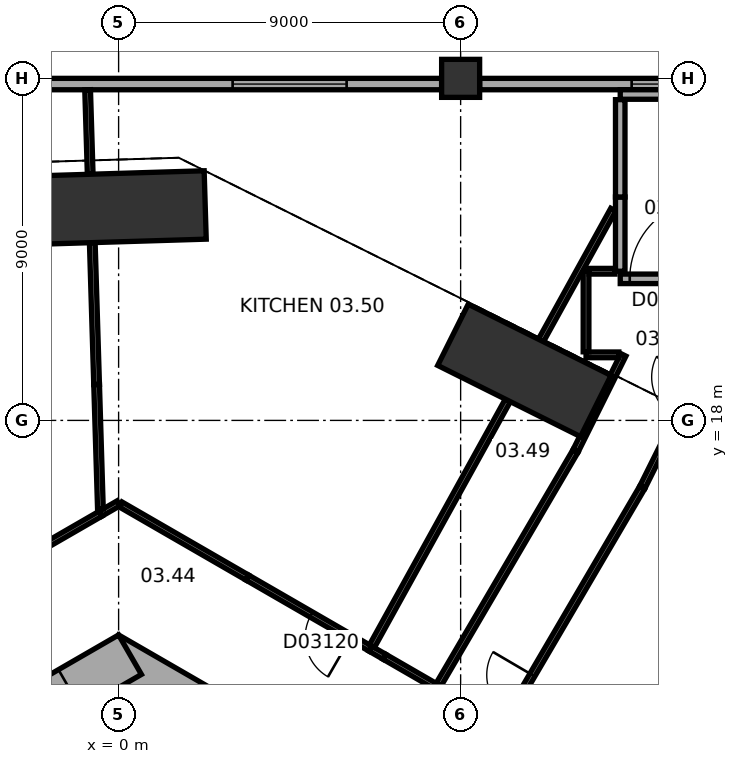
"""IFC4 building model, lengths in metres.
Left out: names, types, materials, properties, quantities, classifications, styles, units other than length and angle.
Written with IfcOpenShell. Run it as: python <this file> out.ifc"""

import sys

from ifc_helpers import new_model, si_unit, direction, frame, frame_2d, origin, origin_2d, place, context, subcontext, project, spatial, rectangle, extrude, element, fill, save


model = new_model("IFC4")
c1 = context("Model", 3, precision=1e-05, world=origin(), true_north=direction((0.0, 1.0)))
c2 = subcontext(c1, "Body", "Model", "MODEL_VIEW")
j1 = project(units=[si_unit("LENGTHUNIT", "METRE"), si_unit("PLANEANGLEUNIT", "RADIAN")], contexts=[c1])
p1 = place(None, origin())
s1 = spatial("IfcSite", under=j1, at=p1, CompositionType="ELEMENT")
p2 = place(p1, origin())
s2 = spatial("IfcBuilding", under=s1, at=p2, CompositionType="ELEMENT")
p3 = place(p2, frame((0.0, 0.0, 21.0)))
s3 = spatial("IfcBuildingStorey", under=s2, at=p3, CompositionType="ELEMENT", Elevation=21.0)
p4 = place(p3, frame((10.677, 19.315, 0.0), z_axis=(0.0, 0.0, 1.0), x_axis=(-0.894935140363, 0.446196251154, 0.0)))
e1 = element("IfcColumn", 1, at=p4, inside=s3, PredefinedType="COLUMN", context=c2, shape_type="SweptSolid", body=[
    extrude(rectangle(XDim=4.2, YDim=1.8, at=origin_2d()), origin(), (0.0, 0.0, 1.0), 8.0),
])
p5 = place(p3, frame((-0.72, 23.577, 0.0), z_axis=(0.0, 0.0, 1.0), x_axis=(-0.999533644135, -0.030536768695, 0.0)))
e2 = element("IfcColumn", 2, at=p5, inside=s3, PredefinedType="COLUMN", context=c2, shape_type="SweptSolid", body=[
    extrude(rectangle(XDim=6.0, YDim=1.8, at=origin_2d()), origin(), (0.0, 0.0, 1.0), 8.0),
])
p6 = place(p3, frame((9.0, 27.0, 0.0), z_axis=(0.0, 0.0, 1.0), x_axis=(1.0, 0.0, 0.0)))
e3 = element("IfcColumn", 3, at=p6, inside=s3, PredefinedType="COLUMN", context=c2, shape_type="SweptSolid", body=[
    extrude(rectangle(XDim=1.0, YDim=1.0, at=origin_2d()), origin(), (0.0, 0.0, 1.0), 8.0),
])
p7 = place(p3, frame((10.4, 5.658, 0.0), z_axis=(0.0, 0.0, 1.0), x_axis=(-0.866021384402, 0.500006961711, 0.0)))
e4 = element("IfcWall", 4, at=p7, inside=s3, PredefinedType="SHEAR", context=c2, shape_type="SweptSolid", body=[
    extrude(rectangle(XDim=12.355, YDim=1.2, at=frame_2d((6.178, 0.0))), origin(), (0.0, 0.0, 1.0), 8.0),
])
p8 = place(p7, frame((2.728, 0.0, 0.0)))
e5 = element("IfcOpeningElement", 5, at=p8, cuts=e4, PredefinedType="OPENING", context=c2, shape_type="SweptSolid", body=[
    extrude(rectangle(XDim=1.1, YDim=2.1, at=frame_2d((0.55, 1.05))), frame((0.0, 0.61, 0.0), z_axis=(0.0, -1.0, 0.0), x_axis=(1.0, 0.0, 0.0)), (0.0, 0.0, 1.0), 1.22),
])
p9 = place(p7, frame((5.328, 0.0, 0.0)))
e6 = element("IfcOpeningElement", 6, at=p9, cuts=e4, PredefinedType="OPENING", context=c2, shape_type="SweptSolid", body=[
    extrude(rectangle(XDim=1.1, YDim=2.1, at=frame_2d((0.55, 1.05))), frame((0.0, 0.61, 0.0), z_axis=(0.0, -1.0, 0.0), x_axis=(1.0, 0.0, 0.0)), (0.0, 0.0, 1.0), 1.22),
])
p10 = place(p7, frame((7.928, 0.0, 0.0)))
e7 = element("IfcOpeningElement", 7, at=p10, cuts=e4, PredefinedType="OPENING", context=c2, shape_type="SweptSolid", body=[
    extrude(rectangle(XDim=1.1, YDim=2.1, at=frame_2d((0.55, 1.05))), frame((0.0, 0.61, 0.0), z_axis=(0.0, -1.0, 0.0), x_axis=(1.0, 0.0, 0.0)), (0.0, 0.0, 1.0), 1.22),
])
p11 = place(p3, frame((0.3, 11.836, 0.0), z_axis=(0.0, 0.0, 1.0), x_axis=(-0.866021384402, -0.500006961711, 0.0)))
e8 = element("IfcWall", 8, at=p11, inside=s3, PredefinedType="SHEAR", context=c2, shape_type="SweptSolid", body=[
    extrude(rectangle(XDim=12.355, YDim=1.2, at=frame_2d((6.178, 0.0))), origin(), (0.0, 0.0, 1.0), 8.0),
])
p12 = place(p11, frame((6.378, 0.0, 0.0)))
e9 = element("IfcOpeningElement", 9, at=p12, cuts=e8, PredefinedType="OPENING", context=c2, shape_type="SweptSolid", body=[
    extrude(rectangle(XDim=1.5, YDim=2.1, at=frame_2d((0.75, 1.05))), frame((0.0, 0.61, 0.0), z_axis=(0.0, -1.0, 0.0), x_axis=(1.0, 0.0, 0.0)), (0.0, 0.0, 1.0), 1.22),
])
p13 = place(p11, frame((1.828, 0.0, 0.0)))
e10 = element("IfcOpeningElement", 10, at=p13, cuts=e8, PredefinedType="OPENING", context=c2, shape_type="SweptSolid", body=[
    extrude(rectangle(XDim=1.1, YDim=2.1, at=frame_2d((0.55, 1.05))), frame((0.0, 0.61, 0.0), z_axis=(0.0, -1.0, 0.0), x_axis=(1.0, 0.0, 0.0)), (0.0, 0.0, 1.0), 1.22),
])
p14 = place(p3, frame((26.5, 26.85, 0.0), z_axis=(0.0, 0.0, 1.0), x_axis=(-1.0, 0.0, 0.0)))
e11 = element("IfcWall", 11, at=p14, inside=s3, PredefinedType="STANDARD", context=c2, shape_type="SweptSolid", body=[
    extrude(rectangle(XDim=17.0, YDim=0.3, at=frame_2d((8.5, 0.0))), origin(), (0.0, 0.0, 1.0), 6.5),
])
p15 = place(p14, frame((3.0, 0.0, 1.0)))
e12 = element("IfcOpeningElement", 12, at=p15, cuts=e11, PredefinedType="OPENING", context=c2, shape_type="SweptSolid", body=[
    extrude(rectangle(XDim=3.0, YDim=4.0, at=frame_2d((1.5, 2.0))), frame((0.0, 0.16, 0.0), z_axis=(0.0, -1.0, 0.0), x_axis=(1.0, 0.0, 0.0)), (0.0, 0.0, 1.0), 0.32),
])
p16 = place(p14, frame((10.0, 0.0, 1.0)))
e13 = element("IfcOpeningElement", 13, at=p16, cuts=e11, PredefinedType="OPENING", context=c2, shape_type="SweptSolid", body=[
    extrude(rectangle(XDim=3.0, YDim=4.0, at=frame_2d((1.5, 2.0))), frame((0.0, 0.16, 0.0), z_axis=(0.0, -1.0, 0.0), x_axis=(1.0, 0.0, 0.0)), (0.0, 0.0, 1.0), 0.32),
])
p17 = place(p3, frame((8.5, 26.85, 0.0), z_axis=(0.0, 0.0, 1.0), x_axis=(-1.0, 0.0, 0.0)))
e14 = element("IfcWall", 14, at=p17, inside=s3, PredefinedType="STANDARD", context=c2, shape_type="SweptSolid", body=[
    extrude(rectangle(XDim=17.0, YDim=0.3, at=frame_2d((8.5, 0.0))), origin(), (0.0, 0.0, 1.0), 6.5),
])
p18 = place(p17, frame((2.5, 0.0, 1.0)))
e15 = element("IfcOpeningElement", 15, at=p18, cuts=e14, PredefinedType="OPENING", context=c2, shape_type="SweptSolid", body=[
    extrude(rectangle(XDim=3.0, YDim=4.0, at=frame_2d((1.5, 2.0))), frame((0.0, 0.16, 0.0), z_axis=(0.0, -1.0, 0.0), x_axis=(1.0, 0.0, 0.0)), (0.0, 0.0, 1.0), 0.32),
])
p19 = place(p17, frame((11.5, 0.0, 1.0)))
e16 = element("IfcOpeningElement", 16, at=p19, cuts=e14, PredefinedType="OPENING", context=c2, shape_type="SweptSolid", body=[
    extrude(rectangle(XDim=3.0, YDim=4.0, at=frame_2d((1.5, 2.0))), frame((0.0, 0.16, 0.0), z_axis=(0.0, -1.0, 0.0), x_axis=(1.0, 0.0, 0.0)), (0.0, 0.0, 1.0), 0.32),
])
p20 = place(p3, frame((8.422, 11.05, 0.0), z_axis=(0.0, 0.0, 1.0), x_axis=(0.50561651199, 0.862758333952, 0.0)))
e17 = element("IfcWall", 17, at=p20, inside=s3, PredefinedType="PARTITIONING", context=c2, shape_type="SweptSolid", body=[
    extrude(rectangle(XDim=7.118, YDim=0.15, at=frame_2d((3.559, 0.0))), origin(), (0.0, 0.0, 1.0), 6.9),
])
p21 = place(p3, frame((6.995, 11.781, 0.0), z_axis=(0.0, 0.0, 1.0), x_axis=(0.866076391369, -0.499911676512, 0.0)))
e18 = element("IfcWall", 18, at=p21, inside=s3, PredefinedType="PARTITIONING", context=c2, shape_type="SweptSolid", body=[
    extrude(rectangle(XDim=1.601, YDim=0.15, at=frame_2d((0.8, 0.0))), origin(), (0.0, 0.0, 1.0), 7.7),
])
p22 = place(p3, frame((6.995, 11.781, 0.0), z_axis=(0.0, 0.0, 1.0), x_axis=(-0.866281716711, 0.49955578997, 0.0)))
e19 = element("IfcWall", 19, at=p22, inside=s3, PredefinedType="PARTITIONING", context=c2, shape_type="SweptSolid", body=[
    extrude(rectangle(XDim=0.423, YDim=0.15, at=frame_2d((0.211, 0.0))), origin(), (0.0, 0.0, 1.0), 7.7),
])
p23 = place(p3, frame((6.629, 11.992, 0.0), z_axis=(0.0, 0.0, 1.0), x_axis=(-0.86599558016, 0.500051652475, 0.0)))
e20 = element("IfcWall", 20, at=p23, inside=s3, PredefinedType="PARTITIONING", context=c2, shape_type="SweptSolid", body=[
    extrude(rectangle(XDim=3.745, YDim=0.15, at=frame_2d((1.872, 0.0))), origin(), (0.0, 0.0, 1.0), 7.7),
])
p24 = place(p23, frame((0.6, 0.0, 0.0)))
e21 = element("IfcOpeningElement", 21, at=p24, cuts=e20, PredefinedType="OPENING", context=c2, shape_type="SweptSolid", body=[
    extrude(rectangle(XDim=1.2, YDim=2.1, at=frame_2d((0.6, 1.05))), frame((0.0, 0.085, 0.0), z_axis=(0.0, -1.0, 0.0), x_axis=(1.0, 0.0, 0.0)), (0.0, 0.0, 1.0), 0.17),
])
p25 = place(p3, frame((6.668, 12.062, 0.0), z_axis=(0.0, 0.0, 1.0), x_axis=(0.483795376692, 0.875181143245, 0.0)))
e22 = element("IfcWall", 22, at=p25, inside=s3, PredefinedType="PARTITIONING", context=c2, shape_type="SweptSolid", body=[
    extrude(rectangle(XDim=7.387, YDim=0.15, at=frame_2d((3.693, 0.0))), origin(), (0.0, 0.0, 1.0), 7.7),
])
p26 = place(p3, frame((19.949, 12.345, 0.0), z_axis=(0.0, 0.0, 1.0), x_axis=(-0.850341306025, -0.526231568102, 0.0)))
e23 = element("IfcWall", 23, at=p26, inside=s3, PredefinedType="MOVABLE", context=c2, shape_type="SweptSolid", body=[
    extrude(rectangle(XDim=7.787, YDim=0.15, at=frame_2d((3.894, 0.0))), origin(), (0.0, 0.0, 1.0), 7.7),
])
p27 = place(p3, frame((3.386, 13.865, 0.0), z_axis=(0.0, 0.0, 1.0), x_axis=(-0.866006051527, 0.500033517596, 0.0)))
e24 = element("IfcWall", 24, at=p27, inside=s3, PredefinedType="PARTITIONING", context=c2, shape_type="SweptSolid", body=[
    extrude(rectangle(XDim=3.85, YDim=0.15, at=frame_2d((1.925, 0.0))), origin(), (0.0, 0.0, 1.0), 7.7),
])
p28 = place(p3, frame((-2.087, 14.615, 0.0), z_axis=(0.0, 0.0, 1.0), x_axis=(0.866006459158, 0.500032811619, 0.0)))
e25 = element("IfcWall", 25, at=p28, inside=s3, PredefinedType="PARTITIONING", context=c2, shape_type="SweptSolid", body=[
    extrude(rectangle(XDim=1.861, YDim=0.15, at=frame_2d((0.931, 0.0))), origin(), (0.0, 0.0, 1.0), 7.7),
])
p29 = place(p3, frame((-0.475, 15.545, 0.0), z_axis=(0.0, 0.0, 1.0), x_axis=(0.865933599817, 0.500158975434, 0.0)))
e26 = element("IfcWall", 26, at=p29, inside=s3, PredefinedType="PARTITIONING", context=c2, shape_type="SweptSolid", body=[
    extrude(rectangle(XDim=0.549, YDim=0.15, at=frame_2d((0.274, 0.0))), origin(), (0.0, 0.0, 1.0), 7.7),
])
p30 = place(p3, frame((13.772, 16.224, 0.0), z_axis=(0.0, 0.0, 1.0), x_axis=(-0.505547889018, -0.862798546539, 0.0)))
e27 = element("IfcWall", 27, at=p30, inside=s3, PredefinedType="PARTITIONING", context=c2, shape_type="SweptSolid", body=[
    extrude(rectangle(XDim=7.156, YDim=0.15, at=frame_2d((3.578, 0.0))), origin(), (0.0, 0.0, 1.0), 7.7),
])
p31 = place(p30, frame((5.706, 0.0, 0.0)))
e28 = element("IfcOpeningElement", 28, at=p31, cuts=e27, PredefinedType="OPENING", context=c2, shape_type="SweptSolid", body=[
    extrude(rectangle(XDim=1.2, YDim=2.1, at=frame_2d((0.6, 1.05))), frame((0.0, 0.085, 0.0), z_axis=(0.0, -1.0, 0.0), x_axis=(1.0, 0.0, 0.0)), (0.0, 0.0, 1.0), 0.17),
])
p32 = place(p3, frame((12.03, 17.209, 0.0), z_axis=(0.0, 0.0, 1.0), x_axis=(0.445753790741, 0.89515560549, 0.0)))
e29 = element("IfcWall", 29, at=p32, inside=s3, PredefinedType="PARTITIONING", context=c2, shape_type="SweptSolid", body=[
    extrude(rectangle(XDim=2.811, YDim=0.15, at=frame_2d((1.405, 0.0))), origin(), (0.0, 0.0, 1.0), 7.7),
])
p33 = place(p3, frame((-0.579, 18.946, 0.0), z_axis=(0.0, 0.0, 1.0), x_axis=(0.030572886356, -0.999532540051, 0.0)))
e30 = element("IfcWall", 30, at=p33, inside=s3, PredefinedType="PARTITIONING", context=c2, shape_type="SweptSolid", body=[
    extrude(rectangle(XDim=3.282, YDim=0.15, at=frame_2d((1.641, 0.0))), origin(), (0.0, 0.0, 1.0), 7.7),
])
p34 = place(p3, frame((-0.579, 18.946, 0.0), z_axis=(0.0, 0.0, 1.0), x_axis=(-0.030471255388, 0.999535643484, 0.0)))
e31 = element("IfcWall", 31, at=p34, inside=s3, PredefinedType="PARTITIONING", context=c2, shape_type="SweptSolid", body=[
    extrude(rectangle(XDim=3.734, YDim=0.15, at=frame_2d((1.867, 0.0))), origin(), (0.0, 0.0, 1.0), 7.7),
])
p35 = place(p3, frame((15.338, 19.365, 0.0), z_axis=(0.0, 0.0, 1.0), x_axis=(-0.44583629063, -0.895114518906, 0.0)))
e32 = element("IfcWall", 32, at=p35, inside=s3, PredefinedType="PARTITIONING", context=c2, shape_type="SweptSolid", body=[
    extrude(rectangle(XDim=3.476, YDim=0.15, at=frame_2d((1.738, 0.0))), origin(), (0.0, 0.0, 1.0), 7.7),
])
p36 = place(p35, frame((0.25, 0.0, 0.0)))
e33 = element("IfcOpeningElement", 33, at=p36, cuts=e32, PredefinedType="OPENING", context=c2, shape_type="SweptSolid", body=[
    extrude(rectangle(XDim=1.2, YDim=2.1, at=frame_2d((0.6, 1.05))), frame((0.0, 0.085, 0.0), z_axis=(0.0, -1.0, 0.0), x_axis=(1.0, 0.0, 0.0)), (0.0, 0.0, 1.0), 0.17),
])
p37 = place(p3, frame((13.163, 19.725, 0.0), z_axis=(0.0, 0.0, 1.0), x_axis=(-1.0, 0.0, 0.0)))
e34 = element("IfcWall", 34, at=p37, inside=s3, PredefinedType="PARTITIONING", context=c2, shape_type="SweptSolid", body=[
    extrude(rectangle(XDim=0.863, YDim=0.15, at=frame_2d((0.432, 0.0))), origin(), (0.0, 0.0, 1.0), 7.7),
])
p38 = place(p3, frame((12.3, 19.805, 0.0), z_axis=(0.0, 0.0, 1.0), x_axis=(0.0, 1.0, 0.0)))
e35 = element("IfcWall", 35, at=p38, inside=s3, PredefinedType="PARTITIONING", context=c2, shape_type="SweptSolid", body=[
    extrude(rectangle(XDim=2.12, YDim=0.15, at=frame_2d((1.06, 0.0))), origin(), (0.0, 0.0, 1.0), 7.7),
])
p39 = place(p3, frame((11.113, 20.104, 0.0), z_axis=(0.0, 0.0, 1.0), x_axis=(0.483823742959, 0.875165461927, 0.0)))
e36 = element("IfcWall", 36, at=p39, inside=s3, PredefinedType="PARTITIONING", context=c2, shape_type="SweptSolid", body=[
    extrude(rectangle(XDim=3.933, YDim=0.15, at=frame_2d((1.967, 0.0))), origin(), (0.0, 0.0, 1.0), 7.7),
])
p40 = place(p3, frame((16.5, 21.725, 0.0), z_axis=(0.0, 0.0, 1.0), x_axis=(-1.0, 0.0, 0.0)))
e37 = element("IfcWall", 37, at=p40, inside=s3, PredefinedType="SOLIDWALL", context=c2, shape_type="SweptSolid", body=[
    extrude(rectangle(XDim=3.3, YDim=0.25, at=frame_2d((1.65, 0.0))), origin(), (0.0, 0.0, 1.0), 7.7),
])
p41 = place(p40, frame((0.95, 0.0, 0.0)))
e38 = element("IfcOpeningElement", 38, at=p41, cuts=e37, PredefinedType="OPENING", context=c2, shape_type="SweptSolid", body=[
    extrude(rectangle(XDim=2.1, YDim=2.4, at=frame_2d((1.05, 1.2))), frame((0.0, 0.135, 0.0), z_axis=(0.0, -1.0, 0.0), x_axis=(1.0, 0.0, 0.0)), (0.0, 0.0, 1.0), 0.27),
])
p42 = place(p3, frame((12.38, 21.925, 0.0), z_axis=(0.0, 0.0, 1.0), x_axis=(1.0, 0.0, 0.0)))
e39 = element("IfcWall", 39, at=p42, inside=s3, PredefinedType="PARTITIONING", context=c2, shape_type="SweptSolid", body=[
    extrude(rectangle(XDim=0.68, YDim=0.15, at=frame_2d((0.34, 0.0))), origin(), (0.0, 0.0, 1.0), 7.7),
])
p43 = place(p3, frame((13.2, 21.925, 0.0), z_axis=(0.0, 0.0, 1.0), x_axis=(0.0, 1.0, 0.0)))
e40 = element("IfcWall", 40, at=p43, inside=s3, PredefinedType="SOLIDWALL", context=c2, shape_type="SweptSolid", body=[
    extrude(rectangle(XDim=1.953, YDim=0.25, at=frame_2d((0.977, 0.0))), origin(), (0.0, 0.0, 1.0), 7.7),
])
p44 = place(p3, frame((13.2, 23.878, 0.0), z_axis=(0.0, 0.0, 1.0), x_axis=(0.0, 1.0, 0.0)))
e41 = element("IfcWall", 41, at=p44, inside=s3, PredefinedType="SOLIDWALL", context=c2, shape_type="SweptSolid", body=[
    extrude(rectangle(XDim=2.562, YDim=0.25, at=frame_2d((1.281, 0.0))), origin(), (0.0, 0.0, 1.0), 7.7),
])
p45 = place(p3, frame((-0.748, 24.477, 0.0), z_axis=(0.0, 0.0, 1.0), x_axis=(-0.030405439098, 0.999537647752, 0.0)))
e42 = element("IfcWall", 42, at=p45, inside=s3, PredefinedType="PARTITIONING", context=c2, shape_type="SweptSolid", body=[
    extrude(rectangle(XDim=2.224, YDim=0.15, at=frame_2d((1.112, 0.0))), origin(), (0.0, 0.0, 1.0), 7.7),
])
p46 = place(p3, frame((24.0, 26.575, 0.0), z_axis=(0.0, 0.0, 1.0), x_axis=(-1.0, 0.0, 0.0)))
e43 = element("IfcWall", 43, at=p46, inside=s3, PredefinedType="SOLIDWALL", context=c2, shape_type="SweptSolid", body=[
    extrude(rectangle(XDim=10.8, YDim=0.25, at=frame_2d((5.4, 0.0))), origin(), (0.0, 0.0, 1.0), 7.7),
])
p47 = place(p16, origin())
e44 = element("IfcWindow", 44, at=p47, inside=s3, PartitioningType="SINGLE_PANEL", PredefinedType="WINDOW", context=c2, shape_type="SweptSolid", body=[
    extrude(rectangle(XDim=3.0, YDim=4.0, at=frame_2d((1.5, 2.0))), frame((0.0, 0.03, 0.0), z_axis=(0.0, -1.0, 0.0), x_axis=(1.0, 0.0, 0.0)), (0.0, 0.0, 1.0), 0.06),
])
fill(e13, e44)
p48 = place(p18, origin())
e45 = element("IfcWindow", 45, at=p48, inside=s3, PartitioningType="SINGLE_PANEL", PredefinedType="WINDOW", context=c2, shape_type="SweptSolid", body=[
    extrude(rectangle(XDim=3.0, YDim=4.0, at=frame_2d((1.5, 2.0))), frame((0.0, 0.03, 0.0), z_axis=(0.0, -1.0, 0.0), x_axis=(1.0, 0.0, 0.0)), (0.0, 0.0, 1.0), 0.06),
])
fill(e15, e45)
p49 = place(p24, origin())
e46 = element("IfcDoor", 46, at=p49, inside=s3, OperationType="SINGLE_SWING_LEFT", PredefinedType="DOOR", context=c2, shape_type="SweptSolid", body=[
    extrude(rectangle(XDim=1.2, YDim=2.1, at=frame_2d((0.6, 1.05))), frame((0.0, 0.025, 0.0), z_axis=(0.0, -1.0, 0.0), x_axis=(1.0, 0.0, 0.0)), (0.0, 0.0, 1.0), 0.05),
])
fill(e21, e46)
p50 = place(p31, origin())
e47 = element("IfcDoor", 47, at=p50, inside=s3, OperationType="SINGLE_SWING_LEFT", PredefinedType="DOOR", context=c2, shape_type="SweptSolid", body=[
    extrude(rectangle(XDim=1.2, YDim=2.1, at=frame_2d((0.6, 1.05))), frame((0.0, 0.025, 0.0), z_axis=(0.0, -1.0, 0.0), x_axis=(1.0, 0.0, 0.0)), (0.0, 0.0, 1.0), 0.05),
])
fill(e28, e47)
p51 = place(p41, frame((2.1, 0.0, 0.0), z_axis=(0.0, 0.0, 1.0), x_axis=(-1.0, 0.0, 0.0)))
e48 = element("IfcDoor", 48, at=p51, inside=s3, OperationType="DOUBLE_DOOR_SINGLE_SWING", PredefinedType="DOOR", context=c2, shape_type="SweptSolid", body=[
    extrude(rectangle(XDim=2.1, YDim=2.4, at=frame_2d((1.05, 1.2))), frame((0.0, 0.025, 0.0), z_axis=(0.0, -1.0, 0.0), x_axis=(1.0, 0.0, 0.0)), (0.0, 0.0, 1.0), 0.05),
])
fill(e38, e48)
save(model, sys.argv[1])
